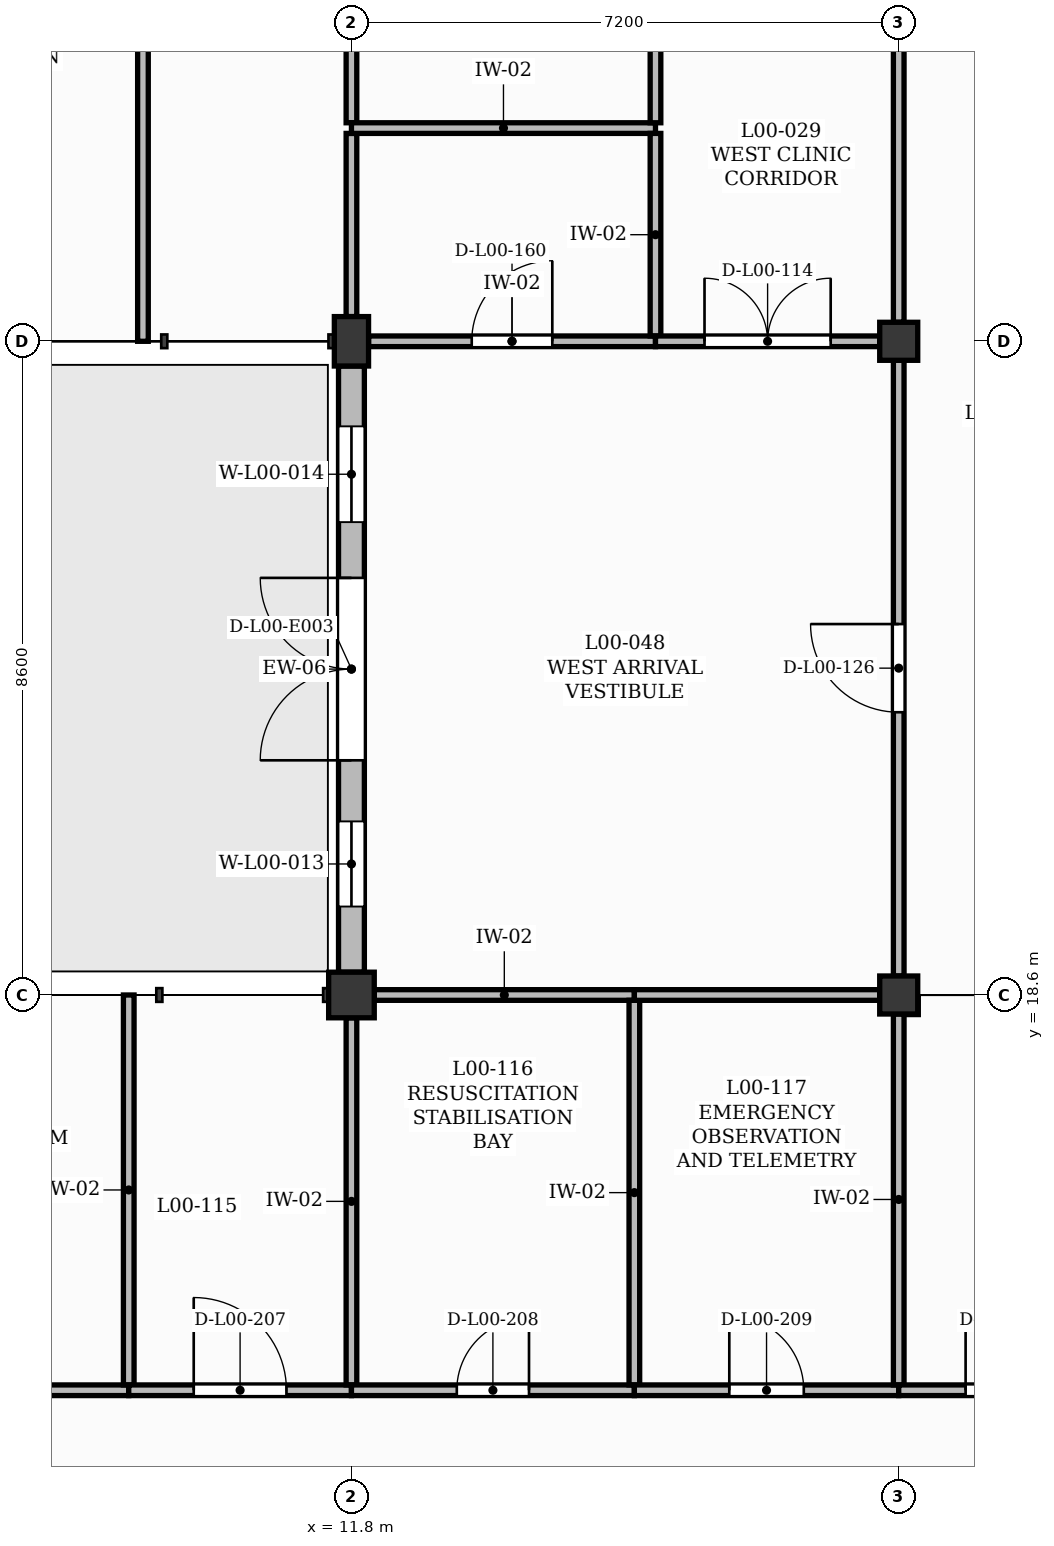
"""IFC4 building model, lengths in metres.
Left out: names, types, materials, properties, quantities, classifications, styles, units other than length and angle.
Written with IfcOpenShell. Run it as: python <this file> out.ifc"""

import sys

from ifc_helpers import new_model, si_unit, direction, frame, frame_2d, origin, origin_2d, place, context, subcontext, project, spatial, rectangle, extrude, element, fill, save


model = new_model("IFC4")
c1 = context("Model", 3, precision=1e-05, world=origin(), true_north=direction((0.0, 1.0)))
c2 = subcontext(c1, "Body", "Model", "MODEL_VIEW")
j1 = project(units=[si_unit("LENGTHUNIT", "METRE"), si_unit("PLANEANGLEUNIT", "RADIAN")], contexts=[c1])
p1 = place(None, origin())
s1 = spatial("IfcSite", under=j1, at=p1, CompositionType="ELEMENT")
p2 = place(p1, origin())
s2 = spatial("IfcBuilding", under=s1, at=p2, CompositionType="ELEMENT")
p3 = place(p2, origin())
s3 = spatial("IfcBuildingStorey", under=s2, at=p3, CompositionType="ELEMENT", Elevation=0.0)
p4 = place(p3, frame((11.8, 18.6, 0.0), z_axis=(0.0, 0.0, 1.0), x_axis=(1.0, 0.0, 0.0)))
e1 = element("IfcColumn", 1, at=p4, inside=s3, PredefinedType="COLUMN", context=c2, shape_type="SweptSolid", body=[
    extrude(rectangle(XDim=0.6, YDim=0.6, at=origin_2d()), origin(), (0.0, 0.0, 1.0), 4.2),
])
p5 = place(p3, frame((11.8, 27.2, 0.0), z_axis=(0.0, 0.0, 1.0), x_axis=(1.0, 0.0, 0.0)))
e2 = element("IfcColumn", 2, at=p5, inside=s3, PredefinedType="COLUMN", context=c2, shape_type="SweptSolid", body=[
    extrude(rectangle(XDim=0.45, YDim=0.65, at=origin_2d()), origin(), (0.0, 0.0, 1.0), 4.2),
])
for number, where, z_axis, x_axis in (
    (3, (19.0, 18.6, 0.0), (0.0, 0.0, 1.0), (1.0, 0.0, 0.0)),
    (4, (19.0, 27.2, 0.0), (0.0, 0.0, 1.0), (1.0, 0.0, 0.0)),
):
    element("IfcColumn", number, at=place(p3, frame(where, z_axis=z_axis, x_axis=x_axis)), inside=s3, PredefinedType="COLUMN", context=c2, shape_type="SweptSolid", body=[
        extrude(rectangle(XDim=0.5, YDim=0.5, at=origin_2d()), origin(), (0.0, 0.0, 1.0), 4.2),
    ])
p6 = place(p3, frame((11.8, 18.9, 0.0), z_axis=(0.0, 0.0, 1.0), x_axis=(0.0, 1.0, 0.0)))
e5 = element("IfcWall", 5, at=p6, inside=s3, PredefinedType="SOLIDWALL", context=c2, shape_type="SweptSolid", body=[
    extrude(rectangle(XDim=7.975, YDim=0.34, at=frame_2d((3.988, 0.0))), origin(), (0.0, 0.0, 1.0), 3.68),
])
p7 = place(p6, frame((2.788, 0.0, 0.0)))
e6 = element("IfcOpeningElement", 6, at=p7, cuts=e5, PredefinedType="OPENING", context=c2, shape_type="SweptSolid", body=[
    extrude(rectangle(XDim=2.4, YDim=2.8, at=frame_2d((1.2, 1.4))), frame((0.0, 0.18, 0.0), z_axis=(0.0, -1.0, 0.0), x_axis=(1.0, 0.0, 0.0)), (0.0, 0.0, 1.0), 0.36),
])
p8 = place(p6, frame((0.864, 0.0, 1.05)))
e7 = element("IfcOpeningElement", 7, at=p8, cuts=e5, PredefinedType="OPENING", context=c2, shape_type="SweptSolid", body=[
    extrude(rectangle(XDim=1.12, YDim=1.65, at=frame_2d((0.56, 0.825))), frame((0.0, 0.18, 0.0), z_axis=(0.0, -1.0, 0.0), x_axis=(1.0, 0.0, 0.0)), (0.0, 0.0, 1.0), 0.36),
])
p9 = place(p6, frame((5.921, 0.0, 1.05)))
e8 = element("IfcOpeningElement", 8, at=p9, cuts=e5, PredefinedType="OPENING", context=c2, shape_type="SweptSolid", body=[
    extrude(rectangle(XDim=1.26, YDim=1.65, at=frame_2d((0.63, 0.825))), frame((0.0, 0.18, 0.0), z_axis=(0.0, -1.0, 0.0), x_axis=(1.0, 0.0, 0.0)), (0.0, 0.0, 1.0), 0.36),
])
p10 = place(p3, frame((4.6, 13.4, 0.0), z_axis=(0.0, 0.0, 1.0), x_axis=(1.0, 0.0, 0.0)))
e9 = element("IfcWall", 9, at=p10, inside=s3, PredefinedType="PARTITIONING", context=c2, shape_type="SweptSolid", body=[
    extrude(rectangle(XDim=4.27, YDim=0.14, at=frame_2d((2.135, 0.0))), origin(), (0.0, 0.0, 1.0), 4.18),
])
p11 = place(p10, frame((1.365, 0.0, 0.0)))
e10 = element("IfcOpeningElement", 10, at=p11, cuts=e9, PredefinedType="OPENING", context=c2, shape_type="SweptSolid", body=[
    extrude(rectangle(XDim=1.54, YDim=2.25, at=frame_2d((0.77, 1.125))), frame((0.0, 0.08, 0.0), z_axis=(0.0, -1.0, 0.0), x_axis=(1.0, 0.0, 0.0)), (0.0, 0.0, 1.0), 0.16),
])
p12 = place(p3, frame((8.87, 13.47, 0.0), z_axis=(0.0, 0.0, 1.0), x_axis=(0.0, 1.0, 0.0)))
e11 = element("IfcWall", 11, at=p12, inside=s3, PredefinedType="PARTITIONING", context=c2, shape_type="SweptSolid", body=[
    extrude(rectangle(XDim=5.13, YDim=0.14, at=frame_2d((2.565, 0.0))), origin(), (0.0, 0.0, 1.0), 4.18),
])
p13 = place(p3, frame((8.87, 13.4, 0.0), z_axis=(0.0, 0.0, 1.0), x_axis=(1.0, 0.0, 0.0)))
e12 = element("IfcWall", 12, at=p13, inside=s3, PredefinedType="PARTITIONING", context=c2, shape_type="SweptSolid", body=[
    extrude(rectangle(XDim=2.93, YDim=0.14, at=frame_2d((1.465, 0.0))), origin(), (0.0, 0.0, 1.0), 4.18),
])
p14 = place(p13, frame((0.855, 0.0, 0.0)))
e13 = element("IfcOpeningElement", 13, at=p14, cuts=e12, PredefinedType="OPENING", context=c2, shape_type="SweptSolid", body=[
    extrude(rectangle(XDim=1.22, YDim=2.1, at=frame_2d((0.61, 1.05))), frame((0.0, 0.08, 0.0), z_axis=(0.0, -1.0, 0.0), x_axis=(1.0, 0.0, 0.0)), (0.0, 0.0, 1.0), 0.16),
])
p15 = place(p3, frame((9.057, 27.2, 0.0), z_axis=(0.0, 0.0, 1.0), x_axis=(0.0, 1.0, 0.0)))
e14 = element("IfcWall", 14, at=p15, inside=s3, PredefinedType="PARTITIONING", context=c2, shape_type="SweptSolid", body=[
    extrude(rectangle(XDim=8.23, YDim=0.14, at=frame_2d((4.115, 0.0))), origin(), (0.0, 0.0, 1.0), 4.18),
])
p16 = place(p3, frame((11.8, 13.47, 0.0), z_axis=(0.0, 0.0, 1.0), x_axis=(0.0, 1.0, 0.0)))
e15 = element("IfcWall", 15, at=p16, inside=s3, PredefinedType="PARTITIONING", context=c2, shape_type="SweptSolid", body=[
    extrude(rectangle(XDim=4.83, YDim=0.14, at=frame_2d((2.415, 0.0))), origin(), (0.0, 0.0, 1.0), 3.5),
])
p17 = place(p3, frame((11.8, 13.4, 0.0), z_axis=(0.0, 0.0, 1.0), x_axis=(1.0, 0.0, 0.0)))
e16 = element("IfcWall", 16, at=p17, inside=s3, PredefinedType="PARTITIONING", context=c2, shape_type="SweptSolid", body=[
    extrude(rectangle(XDim=3.722, YDim=0.14, at=frame_2d((1.861, 0.0))), origin(), (0.0, 0.0, 1.0), 4.18),
])
p18 = place(p17, frame((1.386, 0.0, 0.0)))
e17 = element("IfcOpeningElement", 17, at=p18, cuts=e16, PredefinedType="OPENING", context=c2, shape_type="SweptSolid", body=[
    extrude(rectangle(XDim=0.95, YDim=2.1, at=frame_2d((0.475, 1.05))), frame((0.0, 0.08, 0.0), z_axis=(0.0, -1.0, 0.0), x_axis=(1.0, 0.0, 0.0)), (0.0, 0.0, 1.0), 0.16),
])
p19 = place(p3, frame((12.1, 18.6, 0.0), z_axis=(0.0, 0.0, 1.0), x_axis=(1.0, 0.0, 0.0)))
e18 = element("IfcWall", 18, at=p19, inside=s3, PredefinedType="PARTITIONING", context=c2, shape_type="SweptSolid", body=[
    extrude(rectangle(XDim=3.422, YDim=0.14, at=frame_2d((1.711, 0.0))), origin(), (0.0, 0.0, 1.0), 3.25),
])
p20 = place(p3, frame((11.8, 27.525, 0.0), z_axis=(0.0, 0.0, 1.0), x_axis=(0.0, 1.0, 0.0)))
e19 = element("IfcWall", 19, at=p20, inside=s3, PredefinedType="PARTITIONING", context=c2, shape_type="SweptSolid", body=[
    extrude(rectangle(XDim=2.41, YDim=0.14, at=frame_2d((1.205, 0.0))), origin(), (0.0, 0.0, 1.0), 3.4),
])
p21 = place(p3, frame((12.025, 27.2, 0.0), z_axis=(0.0, 0.0, 1.0), x_axis=(1.0, 0.0, 0.0)))
e20 = element("IfcWall", 20, at=p21, inside=s3, PredefinedType="PARTITIONING", context=c2, shape_type="SweptSolid", body=[
    extrude(rectangle(XDim=3.775, YDim=0.14, at=frame_2d((1.888, 0.0))), origin(), (0.0, 0.0, 1.0), 3.68),
])
p22 = place(p21, frame((1.357, 0.0, 0.0)))
e21 = element("IfcOpeningElement", 21, at=p22, cuts=e20, PredefinedType="OPENING", context=c2, shape_type="SweptSolid", body=[
    extrude(rectangle(XDim=1.06, YDim=2.15, at=frame_2d((0.53, 1.075))), frame((0.0, 0.08, 0.0), z_axis=(0.0, -1.0, 0.0), x_axis=(1.0, 0.0, 0.0)), (0.0, 0.0, 1.0), 0.16),
])
p23 = place(p3, frame((11.8, 30.075, 0.0), z_axis=(0.0, 0.0, 1.0), x_axis=(0.0, 1.0, 0.0)))
e22 = element("IfcWall", 22, at=p23, inside=s3, PredefinedType="PARTITIONING", context=c2, shape_type="SweptSolid", body=[
    extrude(rectangle(XDim=5.355, YDim=0.14, at=frame_2d((2.677, 0.0))), origin(), (0.0, 0.0, 1.0), 3.4),
])
p24 = place(p3, frame((11.8, 30.005, 0.0), z_axis=(0.0, 0.0, 1.0), x_axis=(1.0, 0.0, 0.0)))
e23 = element("IfcWall", 23, at=p24, inside=s3, PredefinedType="PARTITIONING", context=c2, shape_type="SweptSolid", body=[
    extrude(rectangle(XDim=4.0, YDim=0.14, at=frame_2d((2.0, 0.0))), origin(), (0.0, 0.0, 1.0), 4.18),
])
p25 = place(p3, frame((15.522, 13.47, 0.0), z_axis=(0.0, 0.0, 1.0), x_axis=(0.0, 1.0, 0.0)))
e24 = element("IfcWall", 24, at=p25, inside=s3, PredefinedType="PARTITIONING", context=c2, shape_type="SweptSolid", body=[
    extrude(rectangle(XDim=5.06, YDim=0.14, at=frame_2d((2.53, 0.0))), origin(), (0.0, 0.0, 1.0), 4.18),
])
p26 = place(p3, frame((15.522, 13.4, 0.0), z_axis=(0.0, 0.0, 1.0), x_axis=(1.0, 0.0, 0.0)))
e25 = element("IfcWall", 25, at=p26, inside=s3, PredefinedType="PARTITIONING", context=c2, shape_type="SweptSolid", body=[
    extrude(rectangle(XDim=3.478, YDim=0.14, at=frame_2d((1.739, 0.0))), origin(), (0.0, 0.0, 1.0), 4.18),
])
p27 = place(p26, frame((1.249, 0.0, 0.0)))
e26 = element("IfcOpeningElement", 26, at=p27, cuts=e25, PredefinedType="OPENING", context=c2, shape_type="SweptSolid", body=[
    extrude(rectangle(XDim=0.98, YDim=2.15, at=frame_2d((0.49, 1.075))), frame((0.0, 0.08, 0.0), z_axis=(0.0, -1.0, 0.0), x_axis=(1.0, 0.0, 0.0)), (0.0, 0.0, 1.0), 0.16),
])
p28 = place(p3, frame((15.522, 18.6, 0.0), z_axis=(0.0, 0.0, 1.0), x_axis=(1.0, 0.0, 0.0)))
e27 = element("IfcWall", 27, at=p28, inside=s3, PredefinedType="PARTITIONING", context=c2, shape_type="SweptSolid", body=[
    extrude(rectangle(XDim=3.228, YDim=0.14, at=frame_2d((1.614, 0.0))), origin(), (0.0, 0.0, 1.0), 3.25),
])
p29 = place(p3, frame((15.8, 27.27, 0.0), z_axis=(0.0, 0.0, 1.0), x_axis=(0.0, 1.0, 0.0)))
e28 = element("IfcWall", 28, at=p29, inside=s3, PredefinedType="PARTITIONING", context=c2, shape_type="SweptSolid", body=[
    extrude(rectangle(XDim=2.665, YDim=0.14, at=frame_2d((1.333, 0.0))), origin(), (0.0, 0.0, 1.0), 4.18),
])
p30 = place(p3, frame((15.8, 27.2, 0.0), z_axis=(0.0, 0.0, 1.0), x_axis=(1.0, 0.0, 0.0)))
e29 = element("IfcWall", 29, at=p30, inside=s3, PredefinedType="PARTITIONING", context=c2, shape_type="SweptSolid", body=[
    extrude(rectangle(XDim=2.95, YDim=0.14, at=frame_2d((1.475, 0.0))), origin(), (0.0, 0.0, 1.0), 3.68),
])
p31 = place(p30, frame((0.645, 0.0, 0.0)))
e30 = element("IfcOpeningElement", 30, at=p31, cuts=e29, PredefinedType="OPENING", context=c2, shape_type="SweptSolid", body=[
    extrude(rectangle(XDim=1.66, YDim=2.3, at=frame_2d((0.83, 1.15))), frame((0.0, 0.08, 0.0), z_axis=(0.0, -1.0, 0.0), x_axis=(1.0, 0.0, 0.0)), (0.0, 0.0, 1.0), 0.16),
])
p32 = place(p3, frame((15.8, 30.075, 0.0), z_axis=(0.0, 0.0, 1.0), x_axis=(0.0, 1.0, 0.0)))
e31 = element("IfcWall", 31, at=p32, inside=s3, PredefinedType="PARTITIONING", context=c2, shape_type="SweptSolid", body=[
    extrude(rectangle(XDim=5.355, YDim=0.14, at=frame_2d((2.677, 0.0))), origin(), (0.0, 0.0, 1.0), 4.18),
])
p33 = place(p3, frame((19.0, 13.47, 0.0), z_axis=(0.0, 0.0, 1.0), x_axis=(0.0, 1.0, 0.0)))
e32 = element("IfcWall", 32, at=p33, inside=s3, PredefinedType="PARTITIONING", context=c2, shape_type="SweptSolid", body=[
    extrude(rectangle(XDim=4.88, YDim=0.14, at=frame_2d((2.44, 0.0))), origin(), (0.0, 0.0, 1.0), 3.5),
])
p34 = place(p3, frame((19.0, 13.4, 0.0), z_axis=(0.0, 0.0, 1.0), x_axis=(1.0, 0.0, 0.0)))
e33 = element("IfcWall", 33, at=p34, inside=s3, PredefinedType="PARTITIONING", context=c2, shape_type="SweptSolid", body=[
    extrude(rectangle(XDim=2.8, YDim=0.14, at=frame_2d((1.4, 0.0))), origin(), (0.0, 0.0, 1.0), 4.18),
])
p35 = place(p34, frame((0.88, 0.0, 0.0)))
e34 = element("IfcOpeningElement", 34, at=p35, cuts=e33, PredefinedType="OPENING", context=c2, shape_type="SweptSolid", body=[
    extrude(rectangle(XDim=1.04, YDim=2.1, at=frame_2d((0.52, 1.05))), frame((0.0, 0.08, 0.0), z_axis=(0.0, -1.0, 0.0), x_axis=(1.0, 0.0, 0.0)), (0.0, 0.0, 1.0), 0.16),
])
p36 = place(p3, frame((19.0, 18.85, 0.0), z_axis=(0.0, 0.0, 1.0), x_axis=(0.0, 1.0, 0.0)))
e35 = element("IfcWall", 35, at=p36, inside=s3, PredefinedType="PARTITIONING", context=c2, shape_type="SweptSolid", body=[
    extrude(rectangle(XDim=8.1, YDim=0.14, at=frame_2d((4.05, 0.0))), origin(), (0.0, 0.0, 1.0), 3.68),
])
p37 = place(p36, frame((3.47, 0.0, 0.0)))
e36 = element("IfcOpeningElement", 36, at=p37, cuts=e35, PredefinedType="OPENING", context=c2, shape_type="SweptSolid", body=[
    extrude(rectangle(XDim=1.16, YDim=2.1, at=frame_2d((0.58, 1.05))), frame((0.0, 0.08, 0.0), z_axis=(0.0, -1.0, 0.0), x_axis=(1.0, 0.0, 0.0)), (0.0, 0.0, 1.0), 0.16),
])
p38 = place(p3, frame((19.0, 27.45, 0.0), z_axis=(0.0, 0.0, 1.0), x_axis=(0.0, 1.0, 0.0)))
e37 = element("IfcWall", 37, at=p38, inside=s3, PredefinedType="PARTITIONING", context=c2, shape_type="SweptSolid", body=[
    extrude(rectangle(XDim=9.05, YDim=0.14, at=frame_2d((4.525, 0.0))), origin(), (0.0, 0.0, 1.0), 3.4),
])
p39 = place(p38, frame((3.945, 0.0, 0.0)))
e38 = element("IfcOpeningElement", 38, at=p39, cuts=e37, PredefinedType="OPENING", context=c2, shape_type="SweptSolid", body=[
    extrude(rectangle(XDim=1.16, YDim=2.1, at=frame_2d((0.58, 1.05))), frame((0.0, 0.08, 0.0), z_axis=(0.0, -1.0, 0.0), x_axis=(1.0, 0.0, 0.0)), (0.0, 0.0, 1.0), 0.16),
])
p40 = place(p7, origin())
e39 = element("IfcDoor", 39, at=p40, inside=s3, OperationType="DOUBLE_DOOR_SINGLE_SWING", PredefinedType="DOOR", context=c2, shape_type="SweptSolid", body=[
    extrude(rectangle(XDim=2.4, YDim=2.8, at=frame_2d((1.2, 1.4))), frame((0.0, 0.025, 0.0), z_axis=(0.0, -1.0, 0.0), x_axis=(1.0, 0.0, 0.0)), (0.0, 0.0, 1.0), 0.05),
])
fill(e6, e39)
p41 = place(p8, origin())
e40 = element("IfcWindow", 40, at=p41, inside=s3, PartitioningType="SINGLE_PANEL", PredefinedType="WINDOW", context=c2, shape_type="SweptSolid", body=[
    extrude(rectangle(XDim=1.12, YDim=1.65, at=frame_2d((0.56, 0.825))), frame((0.0, 0.03, 0.0), z_axis=(0.0, -1.0, 0.0), x_axis=(1.0, 0.0, 0.0)), (0.0, 0.0, 1.0), 0.06),
])
fill(e7, e40)
p42 = place(p9, origin())
e41 = element("IfcWindow", 41, at=p42, inside=s3, PartitioningType="SINGLE_PANEL", PredefinedType="WINDOW", context=c2, shape_type="SweptSolid", body=[
    extrude(rectangle(XDim=1.26, YDim=1.65, at=frame_2d((0.63, 0.825))), frame((0.0, 0.03, 0.0), z_axis=(0.0, -1.0, 0.0), x_axis=(1.0, 0.0, 0.0)), (0.0, 0.0, 1.0), 0.06),
])
fill(e8, e41)
p43 = place(p31, origin())
e42 = element("IfcDoor", 42, at=p43, inside=s3, OperationType="DOUBLE_DOOR_SINGLE_SWING", PredefinedType="DOOR", context=c2, shape_type="SweptSolid", body=[
    extrude(rectangle(XDim=1.66, YDim=2.3, at=frame_2d((0.83, 1.15))), frame((0.0, 0.025, 0.0), z_axis=(0.0, -1.0, 0.0), x_axis=(1.0, 0.0, 0.0)), (0.0, 0.0, 1.0), 0.05),
])
fill(e30, e42)
p44 = place(p35, origin())
e43 = element("IfcDoor", 43, at=p44, inside=s3, OperationType="SINGLE_SWING_LEFT", PredefinedType="DOOR", context=c2, shape_type="SweptSolid", body=[
    extrude(rectangle(XDim=1.04, YDim=2.1, at=frame_2d((0.52, 1.05))), frame((0.0, 0.025, 0.0), z_axis=(0.0, -1.0, 0.0), x_axis=(1.0, 0.0, 0.0)), (0.0, 0.0, 1.0), 0.05),
])
fill(e34, e43)
p45 = place(p37, origin())
e44 = element("IfcDoor", 44, at=p45, inside=s3, OperationType="SINGLE_SWING_RIGHT", PredefinedType="DOOR", context=c2, shape_type="SweptSolid", body=[
    extrude(rectangle(XDim=1.16, YDim=2.1, at=frame_2d((0.58, 1.05))), frame((0.0, 0.025, 0.0), z_axis=(0.0, -1.0, 0.0), x_axis=(1.0, 0.0, 0.0)), (0.0, 0.0, 1.0), 0.05),
])
fill(e36, e44)
p46 = place(p22, origin())
e45 = element("IfcDoor", 45, at=p46, inside=s3, OperationType="SINGLE_SWING_RIGHT", PredefinedType="DOOR", context=c2, shape_type="SweptSolid", body=[
    extrude(rectangle(XDim=1.06, YDim=2.15, at=frame_2d((0.53, 1.075))), frame((0.0, 0.025, 0.0), z_axis=(0.0, -1.0, 0.0), x_axis=(1.0, 0.0, 0.0)), (0.0, 0.0, 1.0), 0.05),
])
fill(e21, e45)
p47 = place(p14, origin())
e46 = element("IfcDoor", 46, at=p47, inside=s3, OperationType="SINGLE_SWING_LEFT", PredefinedType="DOOR", context=c2, shape_type="SweptSolid", body=[
    extrude(rectangle(XDim=1.22, YDim=2.1, at=frame_2d((0.61, 1.05))), frame((0.0, 0.025, 0.0), z_axis=(0.0, -1.0, 0.0), x_axis=(1.0, 0.0, 0.0)), (0.0, 0.0, 1.0), 0.05),
])
fill(e13, e46)
p48 = place(p18, origin())
e47 = element("IfcDoor", 47, at=p48, inside=s3, OperationType="SINGLE_SWING_RIGHT", PredefinedType="DOOR", context=c2, shape_type="SweptSolid", body=[
    extrude(rectangle(XDim=0.95, YDim=2.1, at=frame_2d((0.475, 1.05))), frame((0.0, 0.025, 0.0), z_axis=(0.0, -1.0, 0.0), x_axis=(1.0, 0.0, 0.0)), (0.0, 0.0, 1.0), 0.05),
])
fill(e17, e47)
p49 = place(p27, origin())
e48 = element("IfcDoor", 48, at=p49, inside=s3, OperationType="SINGLE_SWING_LEFT", PredefinedType="DOOR", context=c2, shape_type="SweptSolid", body=[
    extrude(rectangle(XDim=0.98, YDim=2.15, at=frame_2d((0.49, 1.075))), frame((0.0, 0.025, 0.0), z_axis=(0.0, -1.0, 0.0), x_axis=(1.0, 0.0, 0.0)), (0.0, 0.0, 1.0), 0.05),
])
fill(e26, e48)
save(model, sys.argv[1])
